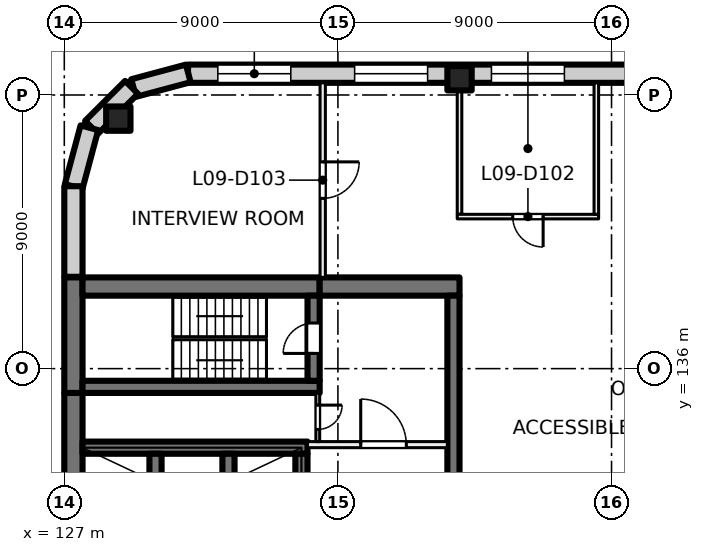
"""IFC4 building model, lengths in metres.
Left out: names, types, materials, properties, quantities, classifications, styles, units other than length and angle.
Written with IfcOpenShell. Run it as: python <this file> out.ifc"""

import sys

from ifc_helpers import new_model, si_unit, direction, frame, frame_2d, origin, origin_2d, place, context, subcontext, project, spatial, rectangle, extrude, element, fill, save


model = new_model("IFC4")
c1 = context("Model", 3, precision=1e-05, world=origin(), true_north=direction((0.0, 1.0)))
c2 = subcontext(c1, "Body", "Model", "MODEL_VIEW")
j1 = project(units=[si_unit("LENGTHUNIT", "METRE"), si_unit("PLANEANGLEUNIT", "RADIAN")], contexts=[c1])
p1 = place(None, origin())
s1 = spatial("IfcSite", under=j1, at=p1, CompositionType="ELEMENT")
p2 = place(p1, origin())
s2 = spatial("IfcBuilding", under=s1, at=p2, CompositionType="ELEMENT")
p3 = place(p2, frame((0.0, 0.0, 43.5)))
s3 = spatial("IfcBuildingStorey", under=s2, at=p3, CompositionType="ELEMENT", Elevation=43.5)
for number, where, z_axis, x_axis in (
    (1, (128.777, 144.223, 0.0), (0.0, 0.0, 1.0), (1.0, 0.0, 0.0)),
    (2, (140.0, 145.55, 0.0), (0.0, 0.0, 1.0), (1.0, 0.0, 0.0)),
):
    element("IfcColumn", number, at=place(p3, frame(where, z_axis=z_axis, x_axis=x_axis)), inside=s3, PredefinedType="COLUMN", context=c2, shape_type="SweptSolid", body=[
        extrude(rectangle(XDim=0.8, YDim=0.8, at=origin_2d()), origin(), (0.0, 0.0, 1.0), 4.0),
    ])
p4 = place(p3, frame((127.3, 120.8, 0.0), z_axis=(0.0, 0.0, 1.0), x_axis=(0.0, 1.0, 0.0)))
e3 = element("IfcWall", 3, at=p4, inside=s3, PredefinedType="SHEAR", context=c2, shape_type="SweptSolid", body=[
    extrude(rectangle(XDim=14.4, YDim=0.6, at=frame_2d((7.2, 0.0))), origin(), (0.0, 0.0, 1.0), 4.0),
])
p5 = place(p3, frame((127.3, 135.2, 0.0), z_axis=(0.0, 0.0, 1.0), x_axis=(0.0, 1.0, 0.0)))
e4 = element("IfcWall", 4, at=p5, inside=s3, PredefinedType="SHEAR", context=c2, shape_type="SweptSolid", body=[
    extrude(rectangle(XDim=3.8, YDim=0.6, at=frame_2d((1.9, 0.0))), origin(), (0.0, 0.0, 1.0), 4.0),
])
p6 = place(p3, frame((127.6, 138.7, 0.0), z_axis=(0.0, 0.0, 1.0), x_axis=(1.0, 0.0, 0.0)))
e5 = element("IfcWall", 5, at=p6, inside=s3, PredefinedType="SHEAR", context=c2, shape_type="SweptSolid", body=[
    extrude(rectangle(XDim=7.8, YDim=0.6, at=frame_2d((3.9, 0.0))), origin(), (0.0, 0.0, 1.0), 4.0),
])
p7 = place(p3, frame((135.4, 138.7, 0.0), z_axis=(0.0, 0.0, 1.0), x_axis=(1.0, 0.0, 0.0)))
e6 = element("IfcWall", 6, at=p7, inside=s3, PredefinedType="SHEAR", context=c2, shape_type="SweptSolid", body=[
    extrude(rectangle(XDim=4.6, YDim=0.6, at=frame_2d((2.3, 0.0))), origin(), (0.0, 0.0, 1.0), 4.0),
])
p8 = place(p3, frame((127.6, 135.4, 0.0), z_axis=(0.0, 0.0, 1.0), x_axis=(1.0, 0.0, 0.0)))
e7 = element("IfcWall", 7, at=p8, inside=s3, PredefinedType="SHEAR", context=c2, shape_type="SweptSolid", body=[
    extrude(rectangle(XDim=7.8, YDim=0.4, at=frame_2d((3.9, 0.0))), origin(), (0.0, 0.0, 1.0), 4.0),
])
p9 = place(p3, frame((135.2, 135.6, 0.0), z_axis=(0.0, 0.0, 1.0), x_axis=(0.0, 1.0, 0.0)))
e8 = element("IfcWall", 8, at=p9, inside=s3, PredefinedType="SHEAR", context=c2, shape_type="SweptSolid", body=[
    extrude(rectangle(XDim=2.8, YDim=0.4, at=frame_2d((1.4, 0.0))), origin(), (0.0, 0.0, 1.0), 4.0),
])
p10 = place(p9, frame((0.9, 0.0, 0.0)))
e9 = element("IfcOpeningElement", 9, at=p10, cuts=e8, PredefinedType="OPENING", context=c2, shape_type="SweptSolid", body=[
    extrude(rectangle(XDim=1.0, YDim=2.1, at=frame_2d((0.5, 1.05))), frame((0.0, 0.21, 0.0), z_axis=(0.0, -1.0, 0.0), x_axis=(1.0, 0.0, 0.0)), (0.0, 0.0, 1.0), 0.42),
])
p11 = place(p3, frame((127.6, 133.4, 0.0), z_axis=(0.0, 0.0, 1.0), x_axis=(1.0, 0.0, 0.0)))
e10 = element("IfcWall", 10, at=p11, inside=s3, PredefinedType="SHEAR", context=c2, shape_type="SweptSolid", body=[
    extrude(rectangle(XDim=7.4, YDim=0.4, at=frame_2d((3.7, 0.0))), origin(), (0.0, 0.0, 1.0), 4.0),
])
for number, where, z_axis, x_axis in (
    (11, (130.0, 130.2, 0.0), (0.0, 0.0, 1.0), (0.0, 1.0, 0.0)),
    (12, (132.4, 130.2, 0.0), (0.0, 0.0, 1.0), (0.0, 1.0, 0.0)),
):
    element("IfcWall", number, at=place(p3, frame(where, z_axis=z_axis, x_axis=x_axis)), inside=s3, PredefinedType="SHEAR", context=c2, shape_type="SweptSolid", body=[
        extrude(rectangle(XDim=3.0, YDim=0.4, at=frame_2d((1.5, 0.0))), origin(), (0.0, 0.0, 1.0), 4.0),
    ])
p12 = place(p3, frame((134.8, 130.2, 0.0), z_axis=(0.0, 0.0, 1.0), x_axis=(0.0, 1.0, 0.0)))
e13 = element("IfcWall", 13, at=p12, inside=s3, PredefinedType="SHEAR", context=c2, shape_type="SweptSolid", body=[
    extrude(rectangle(XDim=3.0, YDim=0.4, at=frame_2d((1.5, 0.0))), origin(), (0.0, 0.0, 1.0), 4.0),
])
p13 = place(p12, frame((0.95, 0.0, 0.0)))
e14 = element("IfcOpeningElement", 14, at=p13, cuts=e13, PredefinedType="OPENING", context=c2, shape_type="SweptSolid", body=[
    extrude(rectangle(XDim=1.1, YDim=2.1, at=frame_2d((0.55, 1.05))), frame((0.0, 0.21, 0.0), z_axis=(0.0, -1.0, 0.0), x_axis=(1.0, 0.0, 0.0)), (0.0, 0.0, 1.0), 0.42),
])
p14 = place(p3, frame((139.8, 129.8, 0.0), z_axis=(0.0, 0.0, 1.0), x_axis=(0.0, 1.0, 0.0)))
e15 = element("IfcWall", 15, at=p14, inside=s3, PredefinedType="SHEAR", context=c2, shape_type="SweptSolid", body=[
    extrude(rectangle(XDim=8.6, YDim=0.4, at=frame_2d((4.3, 0.0))), origin(), (0.0, 0.0, 1.0), 4.0),
])
p15 = place(p3, frame((131.07, 145.7, 0.0), z_axis=(0.0, 0.0, 1.0), x_axis=(1.0, 0.0, 0.0)))
e16 = element("IfcWall", 16, at=p15, inside=s3, PredefinedType="SOLIDWALL", context=c2, shape_type="SweptSolid", body=[
    extrude(rectangle(XDim=31.93, YDim=0.6, at=frame_2d((15.965, 0.0))), origin(), (0.0, 0.0, 1.0), 3.625),
])
p16 = place(p15, frame((0.98, 0.0, 0.9)))
e17 = element("IfcOpeningElement", 17, at=p16, cuts=e16, PredefinedType="OPENING", context=c2, shape_type="SweptSolid", body=[
    extrude(rectangle(XDim=2.4, YDim=2.4, at=frame_2d((1.2, 1.2))), frame((0.0, 0.31, 0.0), z_axis=(0.0, -1.0, 0.0), x_axis=(1.0, 0.0, 0.0)), (0.0, 0.0, 1.0), 0.62),
])
p17 = place(p15, frame((5.48, 0.0, 0.9)))
e18 = element("IfcOpeningElement", 18, at=p17, cuts=e16, PredefinedType="OPENING", context=c2, shape_type="SweptSolid", body=[
    extrude(rectangle(XDim=2.4, YDim=2.4, at=frame_2d((1.2, 1.2))), frame((0.0, 0.31, 0.0), z_axis=(0.0, -1.0, 0.0), x_axis=(1.0, 0.0, 0.0)), (0.0, 0.0, 1.0), 0.62),
])
p18 = place(p15, frame((9.98, 0.0, 0.9)))
e19 = element("IfcOpeningElement", 19, at=p18, cuts=e16, PredefinedType="OPENING", context=c2, shape_type="SweptSolid", body=[
    extrude(rectangle(XDim=2.4, YDim=2.4, at=frame_2d((1.2, 1.2))), frame((0.0, 0.31, 0.0), z_axis=(0.0, -1.0, 0.0), x_axis=(1.0, 0.0, 0.0)), (0.0, 0.0, 1.0), 0.62),
])
p19 = place(p15, frame((14.48, 0.0, 0.9)))
e20 = element("IfcOpeningElement", 20, at=p19, cuts=e16, PredefinedType="OPENING", context=c2, shape_type="SweptSolid", body=[
    extrude(rectangle(XDim=2.4, YDim=2.4, at=frame_2d((1.2, 1.2))), frame((0.0, 0.31, 0.0), z_axis=(0.0, -1.0, 0.0), x_axis=(1.0, 0.0, 0.0)), (0.0, 0.0, 1.0), 0.62),
])
p20 = place(p15, frame((18.98, 0.0, 0.9)))
e21 = element("IfcOpeningElement", 21, at=p20, cuts=e16, PredefinedType="OPENING", context=c2, shape_type="SweptSolid", body=[
    extrude(rectangle(XDim=2.4, YDim=2.4, at=frame_2d((1.2, 1.2))), frame((0.0, 0.31, 0.0), z_axis=(0.0, -1.0, 0.0), x_axis=(1.0, 0.0, 0.0)), (0.0, 0.0, 1.0), 0.62),
])
p21 = place(p15, frame((23.48, 0.0, 0.9)))
e22 = element("IfcOpeningElement", 22, at=p21, cuts=e16, PredefinedType="OPENING", context=c2, shape_type="SweptSolid", body=[
    extrude(rectangle(XDim=2.4, YDim=2.4, at=frame_2d((1.2, 1.2))), frame((0.0, 0.31, 0.0), z_axis=(0.0, -1.0, 0.0), x_axis=(1.0, 0.0, 0.0)), (0.0, 0.0, 1.0), 0.62),
])
p22 = place(p15, frame((27.98, 0.0, 0.9)))
e23 = element("IfcOpeningElement", 23, at=p22, cuts=e16, PredefinedType="OPENING", context=c2, shape_type="SweptSolid", body=[
    extrude(rectangle(XDim=2.4, YDim=2.4, at=frame_2d((1.2, 1.2))), frame((0.0, 0.31, 0.0), z_axis=(0.0, -1.0, 0.0), x_axis=(1.0, 0.0, 0.0)), (0.0, 0.0, 1.0), 0.62),
])
for number, where, z_axis, x_axis in (
    (24, (129.281, 145.229, 0.0), (0.0, 0.0, 1.0), (0.966, 0.259, 0.0)),
    (25, (127.896, 143.936, 0.0), (0.0, 0.0, 1.0), (0.707, 0.707, 0.0)),
):
    element("IfcWall", number, at=place(p3, frame(where, z_axis=z_axis, x_axis=x_axis)), inside=s3, PredefinedType="SOLIDWALL", context=c2, shape_type="SweptSolid", body=[
        extrude(rectangle(XDim=1.861, YDim=0.6, at=frame_2d((0.93, 0.0))), origin(), (0.0, 0.0, 1.0), 3.625),
    ])
p23 = place(p3, frame((127.308, 141.99, 0.0), z_axis=(0.0, 0.0, 1.0), x_axis=(0.258839784042, 0.965920269068, 0.0)))
e26 = element("IfcWall", 26, at=p23, inside=s3, PredefinedType="SOLIDWALL", context=c2, shape_type="SweptSolid", body=[
    extrude(rectangle(XDim=2.0, YDim=0.6, at=frame_2d((1.0, 0.0))), origin(), (0.0, 0.0, 1.0), 3.625),
])
p24 = place(p3, frame((127.3, 139.02, 0.0), z_axis=(0.0, 0.0, 1.0), x_axis=(0.0, 1.0, 0.0)))
e27 = element("IfcWall", 27, at=p24, inside=s3, PredefinedType="SOLIDWALL", context=c2, shape_type="SweptSolid", body=[
    extrude(rectangle(XDim=2.98, YDim=0.6, at=frame_2d((1.49, 0.0))), origin(), (0.0, 0.0, 1.0), 3.625),
])
p25 = place(p3, frame((135.0, 133.5, 0.0), z_axis=(0.0, 0.0, 1.0), x_axis=(1.0, 0.0, 0.0)))
e28 = element("IfcWall", 28, at=p25, inside=s3, PredefinedType="PARTITIONING", context=c2, shape_type="SweptSolid", body=[
    extrude(rectangle(XDim=4.6, YDim=0.2, at=frame_2d((2.3, 0.0))), origin(), (0.0, 0.0, 1.0), 3.625),
])
p26 = place(p25, frame((1.75, 0.0, 0.0)))
e29 = element("IfcOpeningElement", 29, at=p26, cuts=e28, PredefinedType="OPENING", context=c2, shape_type="SweptSolid", body=[
    extrude(rectangle(XDim=1.5, YDim=2.1, at=frame_2d((0.75, 1.05))), frame((0.0, 0.11, 0.0), z_axis=(0.0, -1.0, 0.0), x_axis=(1.0, 0.0, 0.0)), (0.0, 0.0, 1.0), 0.22),
])
p27 = place(p3, frame((135.337, 135.2, 0.0), z_axis=(0.0, 0.0, 1.0), x_axis=(0.0, -1.0, 0.0)))
e30 = element("IfcWall", 30, at=p27, inside=s3, PredefinedType="PARTITIONING", context=c2, shape_type="SweptSolid", body=[
    extrude(rectangle(XDim=1.6, YDim=0.125, at=frame_2d((0.8, 0.0))), origin(), (0.0, 0.0, 1.0), 3.625),
])
p28 = place(p27, frame((0.4, 0.0, 0.0)))
e31 = element("IfcOpeningElement", 31, at=p28, cuts=e30, PredefinedType="OPENING", context=c2, shape_type="SweptSolid", body=[
    extrude(rectangle(XDim=0.8, YDim=2.1, at=frame_2d((0.4, 1.05))), frame((0.0, 0.073, 0.0), z_axis=(0.0, -1.0, 0.0), x_axis=(1.0, 0.0, 0.0)), (0.0, 0.0, 1.0), 0.145),
])
p29 = place(p3, frame((135.5, 145.4, 0.0), z_axis=(0.0, 0.0, 1.0), x_axis=(0.0, -1.0, 0.0)))
e32 = element("IfcWall", 32, at=p29, inside=s3, PredefinedType="PARTITIONING", context=c2, shape_type="SweptSolid", body=[
    extrude(rectangle(XDim=6.4, YDim=0.175, at=frame_2d((3.2, 0.0))), origin(), (0.0, 0.0, 1.0), 3.625),
])
p30 = place(p29, frame((2.6, 0.0, 0.0)))
e33 = element("IfcOpeningElement", 33, at=p30, cuts=e32, PredefinedType="OPENING", context=c2, shape_type="SweptSolid", body=[
    extrude(rectangle(XDim=1.2, YDim=2.1, at=frame_2d((0.6, 1.05))), frame((0.0, 0.097, 0.0), z_axis=(0.0, -1.0, 0.0), x_axis=(1.0, 0.0, 0.0)), (0.0, 0.0, 1.0), 0.195),
])
p31 = place(p3, frame((140.0, 141.075, 0.0), z_axis=(0.0, 0.0, 1.0), x_axis=(0.0, 1.0, 0.0)))
e34 = element("IfcWall", 34, at=p31, inside=s3, PredefinedType="PARTITIONING", context=c2, shape_type="SweptSolid", body=[
    extrude(rectangle(XDim=4.325, YDim=0.15, at=frame_2d((2.163, 0.0))), origin(), (0.0, 0.0, 1.0), 3.625),
])
p32 = place(p3, frame((144.575, 141.0, 0.0), z_axis=(0.0, 0.0, 1.0), x_axis=(-1.0, 0.0, 0.0)))
e35 = element("IfcWall", 35, at=p32, inside=s3, PredefinedType="PARTITIONING", context=c2, shape_type="SweptSolid", body=[
    extrude(rectangle(XDim=4.65, YDim=0.15, at=frame_2d((2.325, 0.0))), origin(), (0.0, 0.0, 1.0), 3.625),
])
p33 = place(p32, frame((1.825, 0.0, 0.0)))
e36 = element("IfcOpeningElement", 36, at=p33, cuts=e35, PredefinedType="OPENING", context=c2, shape_type="SweptSolid", body=[
    extrude(rectangle(XDim=1.0, YDim=2.1, at=frame_2d((0.5, 1.05))), frame((0.0, 0.085, 0.0), z_axis=(0.0, -1.0, 0.0), x_axis=(1.0, 0.0, 0.0)), (0.0, 0.0, 1.0), 0.17),
])
p34 = place(p3, frame((144.5, 145.4, 0.0), z_axis=(0.0, 0.0, 1.0), x_axis=(0.0, -1.0, 0.0)))
e37 = element("IfcWall", 37, at=p34, inside=s3, PredefinedType="PARTITIONING", context=c2, shape_type="SweptSolid", body=[
    extrude(rectangle(XDim=4.325, YDim=0.15, at=frame_2d((2.163, 0.0))), origin(), (0.0, 0.0, 1.0), 3.625),
])
p35 = place(p16, origin())
e38 = element("IfcWindow", 38, at=p35, inside=s3, PartitioningType="SINGLE_PANEL", PredefinedType="WINDOW", context=c2, shape_type="SweptSolid", body=[
    extrude(rectangle(XDim=2.4, YDim=2.4, at=frame_2d((1.2, 1.2))), frame((0.0, 0.03, 0.0), z_axis=(0.0, -1.0, 0.0), x_axis=(1.0, 0.0, 0.0)), (0.0, 0.0, 1.0), 0.06),
])
fill(e17, e38)
p36 = place(p17, origin())
e39 = element("IfcWindow", 39, at=p36, inside=s3, PartitioningType="SINGLE_PANEL", PredefinedType="WINDOW", context=c2, shape_type="SweptSolid", body=[
    extrude(rectangle(XDim=2.4, YDim=2.4, at=frame_2d((1.2, 1.2))), frame((0.0, 0.03, 0.0), z_axis=(0.0, -1.0, 0.0), x_axis=(1.0, 0.0, 0.0)), (0.0, 0.0, 1.0), 0.06),
])
fill(e18, e39)
p37 = place(p18, origin())
e40 = element("IfcWindow", 40, at=p37, inside=s3, PartitioningType="SINGLE_PANEL", PredefinedType="WINDOW", context=c2, shape_type="SweptSolid", body=[
    extrude(rectangle(XDim=2.4, YDim=2.4, at=frame_2d((1.2, 1.2))), frame((0.0, 0.03, 0.0), z_axis=(0.0, -1.0, 0.0), x_axis=(1.0, 0.0, 0.0)), (0.0, 0.0, 1.0), 0.06),
])
fill(e19, e40)
p38 = place(p26, origin())
e41 = element("IfcDoor", 41, at=p38, inside=s3, OperationType="DOUBLE_DOOR_SINGLE_SWING", PredefinedType="DOOR", context=c2, shape_type="SweptSolid", body=[
    extrude(rectangle(XDim=1.5, YDim=2.1, at=frame_2d((0.75, 1.05))), frame((0.0, 0.025, 0.0), z_axis=(0.0, -1.0, 0.0), x_axis=(1.0, 0.0, 0.0)), (0.0, 0.0, 1.0), 0.05),
])
fill(e29, e41)
p39 = place(p10, origin())
e42 = element("IfcDoor", 42, at=p39, inside=s3, OperationType="SINGLE_SWING_LEFT", PredefinedType="DOOR", context=c2, shape_type="SweptSolid", body=[
    extrude(rectangle(XDim=1.0, YDim=2.1, at=frame_2d((0.5, 1.05))), frame((0.0, 0.025, 0.0), z_axis=(0.0, -1.0, 0.0), x_axis=(1.0, 0.0, 0.0)), (0.0, 0.0, 1.0), 0.05),
])
fill(e9, e42)
p40 = place(p28, origin())
e43 = element("IfcDoor", 43, at=p40, inside=s3, OperationType="SINGLE_SWING_RIGHT", PredefinedType="DOOR", context=c2, shape_type="SweptSolid", body=[
    extrude(rectangle(XDim=0.8, YDim=2.1, at=frame_2d((0.4, 1.05))), frame((0.0, 0.025, 0.0), z_axis=(0.0, -1.0, 0.0), x_axis=(1.0, 0.0, 0.0)), (0.0, 0.0, 1.0), 0.05),
])
fill(e31, e43)
p41 = place(p33, origin())
e44 = element("IfcDoor", 44, at=p41, inside=s3, OperationType="SINGLE_SWING_LEFT", PredefinedType="DOOR", context=c2, shape_type="SweptSolid", body=[
    extrude(rectangle(XDim=1.0, YDim=2.1, at=frame_2d((0.5, 1.05))), frame((0.0, 0.025, 0.0), z_axis=(0.0, -1.0, 0.0), x_axis=(1.0, 0.0, 0.0)), (0.0, 0.0, 1.0), 0.05),
])
fill(e36, e44)
p42 = place(p30, origin())
e45 = element("IfcDoor", 45, at=p42, inside=s3, OperationType="DOUBLE_DOOR_SINGLE_SWING", PredefinedType="DOOR", context=c2, shape_type="SweptSolid", body=[
    extrude(rectangle(XDim=1.2, YDim=2.1, at=frame_2d((0.6, 1.05))), frame((0.0, 0.025, 0.0), z_axis=(0.0, -1.0, 0.0), x_axis=(1.0, 0.0, 0.0)), (0.0, 0.0, 1.0), 0.05),
])
fill(e33, e45)
save(model, sys.argv[1])
